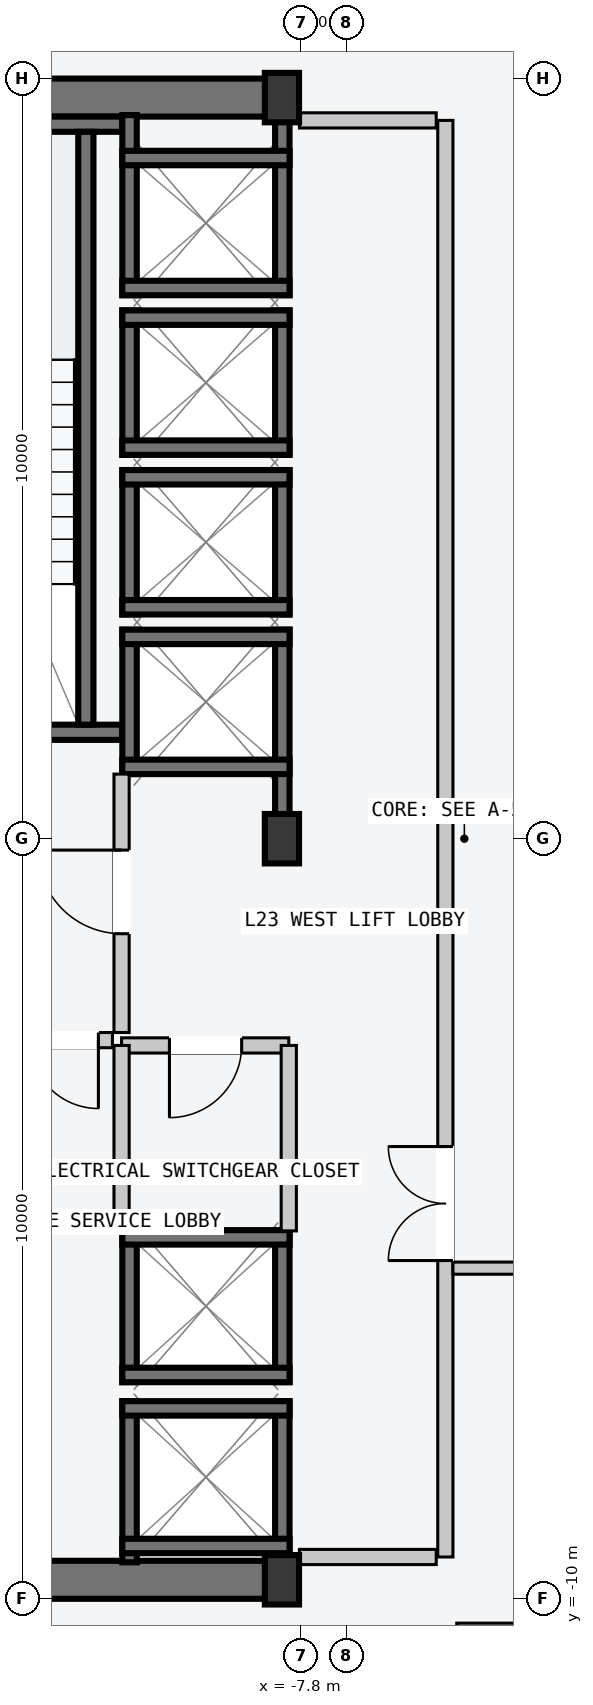
"""IFC4 building model, lengths in metres.
Left out: names, types, materials, properties, quantities, classifications, styles, units other than length and angle.
Written with IfcOpenShell. Run it as: python <this file> out.ifc"""

import sys

from ifc_helpers import new_model, si_unit, direction, frame, frame_2d, origin, origin_2d, place, context, subcontext, project, spatial, rectangle, i_section, extrude, element, fill, save


model = new_model("IFC4")
c1 = context("Model", 3, precision=1e-05, world=origin(), true_north=direction((0.0, 1.0)))
c2 = subcontext(c1, "Body", "Model", "MODEL_VIEW")
j1 = project(units=[si_unit("LENGTHUNIT", "METRE"), si_unit("PLANEANGLEUNIT", "RADIAN")], contexts=[c1])
p1 = place(None, origin())
s1 = spatial("IfcSite", under=j1, at=p1, CompositionType="ELEMENT")
p2 = place(p1, origin())
s2 = spatial("IfcBuilding", under=s1, at=p2, CompositionType="ELEMENT")
p3 = place(p2, frame((0.0, 0.0, 91.8)))
s3 = spatial("IfcBuildingStorey", under=s2, at=p3, CompositionType="ELEMENT", Elevation=91.8)
for number, where, z_axis, x_axis in (
    (1, (-14.53, -9.75, -0.2), (0.0, 0.0, 1.0), (1.0, 0.0, 0.0)),
    (2, (-14.53, 9.75, -0.2), (0.0, 0.0, 1.0), (1.0, 0.0, 0.0)),
):
    element("IfcWall", number, at=place(p3, frame(where, z_axis=z_axis, x_axis=x_axis)), inside=s3, PredefinedType="SHEAR", context=c2, shape_type="SweptSolid", body=[
        extrude(rectangle(XDim=6.46, YDim=0.5, at=frame_2d((3.23, 0.0))), origin(), (0.0, 0.0, 1.0), 3.6),
    ])
p4 = place(p3, frame((-14.25, 1.4, -0.2), z_axis=(0.0, 0.0, 1.0), x_axis=(1.0, 0.0, 0.0)))
e3 = element("IfcWall", 3, at=p4, inside=s3, PredefinedType="SOLIDWALL", context=c2, shape_type="SweptSolid", body=[
    extrude(rectangle(XDim=4.1, YDim=0.2, at=frame_2d((2.05, 0.0))), origin(), (0.0, 0.0, 1.0), 3.6),
])
p5 = place(p4, frame((1.5, 0.0, 0.2)))
e4 = element("IfcOpeningElement", 4, at=p5, cuts=e3, PredefinedType="OPENING", context=c2, shape_type="SweptSolid", body=[
    extrude(rectangle(XDim=1.12, YDim=2.18, at=frame_2d((0.56, 1.09))), frame((0.0, 0.11, 0.0), z_axis=(0.0, -1.0, 0.0), x_axis=(1.0, 0.0, 0.0)), (0.0, 0.0, 1.0), 0.22),
])
p6 = place(p3, frame((-14.25, 9.4, -0.2), z_axis=(0.0, 0.0, 1.0), x_axis=(1.0, 0.0, 0.0)))
e5 = element("IfcWall", 5, at=p6, inside=s3, PredefinedType="SOLIDWALL", context=c2, shape_type="SweptSolid", body=[
    extrude(rectangle(XDim=4.1, YDim=0.2, at=frame_2d((2.05, 0.0))), origin(), (0.0, 0.0, 1.0), 3.6),
])
p7 = place(p3, frame((-10.63, 1.5, -0.2), z_axis=(0.0, 0.0, 1.0), x_axis=(0.0, 1.0, 0.0)))
e6 = element("IfcWall", 6, at=p7, inside=s3, PredefinedType="SOLIDWALL", context=c2, shape_type="SweptSolid", body=[
    extrude(rectangle(XDim=7.8, YDim=0.2, at=frame_2d((3.9, 0.0))), origin(), (0.0, 0.0, 1.0), 3.6),
])
for number, where, z_axis, x_axis in (
    (7, (-8.05, -9.75, 0.0), (0.0, 0.0, 1.0), (1.0, 0.0, 0.0)),
    (8, (-8.05, 0.0, 0.0), (0.0, 0.0, 1.0), (1.0, 0.0, 0.0)),
    (9, (-8.05, 9.75, 0.0), (0.0, 0.0, 1.0), (1.0, 0.0, 0.0)),
):
    element("IfcColumn", number, at=place(p3, frame(where, z_axis=z_axis, x_axis=x_axis)), inside=s3, PredefinedType="COLUMN", context=c2, shape_type="SweptSolid", body=[
        extrude(i_section(OverallWidth=0.45, OverallDepth=0.65, WebThickness=0.025, FlangeThickness=0.04, at=origin_2d()), origin(), (0.0, 0.0, 1.0), 3.6),
    ])
p8 = place(p3, frame((-8.045, 0.21, -0.2), z_axis=(0.0, 0.0, 1.0), x_axis=(0.0, 1.0, 0.0)))
e10 = element("IfcWall", 10, at=p8, inside=s3, PredefinedType="SOLIDWALL", context=c2, shape_type="SweptSolid", body=[
    extrude(rectangle(XDim=2.54, YDim=0.19, at=frame_2d((1.27, 0.0))), origin(), (0.0, 0.0, 1.0), 3.6),
])
p9 = place(p3, frame((-10.055, 0.85, -0.2), z_axis=(0.0, 0.0, 1.0), x_axis=(0.0, 1.0, 0.0)))
e11 = element("IfcWall", 11, at=p9, inside=s3, PredefinedType="SOLIDWALL", context=c2, shape_type="SweptSolid", body=[
    extrude(rectangle(XDim=1.9, YDim=0.19, at=frame_2d((0.95, 0.0))), origin(), (0.0, 0.0, 1.0), 3.6),
])
for number, where, z_axis, x_axis in (
    (12, (-10.15, 2.655, -0.2), (0.0, 0.0, 1.0), (1.0, 0.0, 0.0)),
    (13, (-10.15, 0.945, -0.2), (0.0, 0.0, 1.0), (1.0, 0.0, 0.0)),
):
    element("IfcWall", number, at=place(p3, frame(where, z_axis=z_axis, x_axis=x_axis)), inside=s3, PredefinedType="SOLIDWALL", context=c2, shape_type="SweptSolid", body=[
        extrude(rectangle(XDim=2.2, YDim=0.19, at=frame_2d((1.1, 0.0))), origin(), (0.0, 0.0, 1.0), 3.6),
    ])
for number, where, z_axis, x_axis in (
    (14, (-8.045, 2.95, -0.2), (0.0, 0.0, 1.0), (0.0, 1.0, 0.0)),
    (15, (-10.055, 2.95, -0.2), (0.0, 0.0, 1.0), (0.0, 1.0, 0.0)),
):
    element("IfcWall", number, at=place(p3, frame(where, z_axis=z_axis, x_axis=x_axis)), inside=s3, PredefinedType="SOLIDWALL", context=c2, shape_type="SweptSolid", body=[
        extrude(rectangle(XDim=1.9, YDim=0.19, at=frame_2d((0.95, 0.0))), origin(), (0.0, 0.0, 1.0), 3.6),
    ])
for number, where, z_axis, x_axis in (
    (16, (-10.15, 4.755, -0.2), (0.0, 0.0, 1.0), (1.0, 0.0, 0.0)),
    (17, (-10.15, 3.045, -0.2), (0.0, 0.0, 1.0), (1.0, 0.0, 0.0)),
):
    element("IfcWall", number, at=place(p3, frame(where, z_axis=z_axis, x_axis=x_axis)), inside=s3, PredefinedType="SOLIDWALL", context=c2, shape_type="SweptSolid", body=[
        extrude(rectangle(XDim=2.2, YDim=0.19, at=frame_2d((1.1, 0.0))), origin(), (0.0, 0.0, 1.0), 3.6),
    ])
for number, where, z_axis, x_axis in (
    (18, (-8.045, 5.05, -0.2), (0.0, 0.0, 1.0), (0.0, 1.0, 0.0)),
    (19, (-10.055, 5.05, -0.2), (0.0, 0.0, 1.0), (0.0, 1.0, 0.0)),
):
    element("IfcWall", number, at=place(p3, frame(where, z_axis=z_axis, x_axis=x_axis)), inside=s3, PredefinedType="SOLIDWALL", context=c2, shape_type="SweptSolid", body=[
        extrude(rectangle(XDim=1.9, YDim=0.19, at=frame_2d((0.95, 0.0))), origin(), (0.0, 0.0, 1.0), 3.6),
    ])
for number, where, z_axis, x_axis in (
    (20, (-10.15, 6.855, -0.2), (0.0, 0.0, 1.0), (1.0, 0.0, 0.0)),
    (21, (-10.15, 5.145, -0.2), (0.0, 0.0, 1.0), (1.0, 0.0, 0.0)),
):
    element("IfcWall", number, at=place(p3, frame(where, z_axis=z_axis, x_axis=x_axis)), inside=s3, PredefinedType="SOLIDWALL", context=c2, shape_type="SweptSolid", body=[
        extrude(rectangle(XDim=2.2, YDim=0.19, at=frame_2d((1.1, 0.0))), origin(), (0.0, 0.0, 1.0), 3.6),
    ])
for number, where, z_axis, x_axis in (
    (22, (-8.045, 7.15, -0.2), (0.0, 0.0, 1.0), (0.0, 1.0, 0.0)),
    (23, (-10.055, 7.15, -0.2), (0.0, 0.0, 1.0), (0.0, 1.0, 0.0)),
):
    element("IfcWall", number, at=place(p3, frame(where, z_axis=z_axis, x_axis=x_axis)), inside=s3, PredefinedType="SOLIDWALL", context=c2, shape_type="SweptSolid", body=[
        extrude(rectangle(XDim=2.37, YDim=0.19, at=frame_2d((1.185, 0.0))), origin(), (0.0, 0.0, 1.0), 3.6),
    ])
for number, where, z_axis, x_axis in (
    (24, (-10.15, 8.955, -0.2), (0.0, 0.0, 1.0), (1.0, 0.0, 0.0)),
    (25, (-10.15, 7.245, -0.2), (0.0, 0.0, 1.0), (1.0, 0.0, 0.0)),
):
    element("IfcWall", number, at=place(p3, frame(where, z_axis=z_axis, x_axis=x_axis)), inside=s3, PredefinedType="SOLIDWALL", context=c2, shape_type="SweptSolid", body=[
        extrude(rectangle(XDim=2.2, YDim=0.19, at=frame_2d((1.1, 0.0))), origin(), (0.0, 0.0, 1.0), 3.6),
    ])
for number, where, z_axis, x_axis in (
    (26, (-8.045, -9.52, -0.2), (0.0, 0.0, 1.0), (0.0, 1.0, 0.0)),
    (27, (-10.055, -9.52, -0.2), (0.0, 0.0, 1.0), (0.0, 1.0, 0.0)),
):
    element("IfcWall", number, at=place(p3, frame(where, z_axis=z_axis, x_axis=x_axis)), inside=s3, PredefinedType="SOLIDWALL", context=c2, shape_type="SweptSolid", body=[
        extrude(rectangle(XDim=2.12, YDim=0.19, at=frame_2d((1.06, 0.0))), origin(), (0.0, 0.0, 1.0), 3.6),
    ])
for number, where, z_axis, x_axis in (
    (28, (-10.15, -7.495, -0.2), (0.0, 0.0, 1.0), (1.0, 0.0, 0.0)),
    (29, (-10.15, -9.305, -0.2), (0.0, 0.0, 1.0), (1.0, 0.0, 0.0)),
):
    element("IfcWall", number, at=place(p3, frame(where, z_axis=z_axis, x_axis=x_axis)), inside=s3, PredefinedType="SOLIDWALL", context=c2, shape_type="SweptSolid", body=[
        extrude(rectangle(XDim=2.2, YDim=0.19, at=frame_2d((1.1, 0.0))), origin(), (0.0, 0.0, 1.0), 3.6),
    ])
for number, where, z_axis, x_axis in (
    (30, (-8.045, -7.15, -0.2), (0.0, 0.0, 1.0), (0.0, 1.0, 0.0)),
    (31, (-10.055, -7.15, -0.2), (0.0, 0.0, 1.0), (0.0, 1.0, 0.0)),
):
    element("IfcWall", number, at=place(p3, frame(where, z_axis=z_axis, x_axis=x_axis)), inside=s3, PredefinedType="SOLIDWALL", context=c2, shape_type="SweptSolid", body=[
        extrude(rectangle(XDim=2.0, YDim=0.19, at=frame_2d((1.0, 0.0))), origin(), (0.0, 0.0, 1.0), 3.6),
    ])
for number, where, z_axis, x_axis in (
    (32, (-10.15, -5.245, -0.2), (0.0, 0.0, 1.0), (1.0, 0.0, 0.0)),
    (33, (-10.15, -7.055, -0.2), (0.0, 0.0, 1.0), (1.0, 0.0, 0.0)),
):
    element("IfcWall", number, at=place(p3, frame(where, z_axis=z_axis, x_axis=x_axis)), inside=s3, PredefinedType="SOLIDWALL", context=c2, shape_type="SweptSolid", body=[
        extrude(rectangle(XDim=2.2, YDim=0.19, at=frame_2d((1.1, 0.0))), origin(), (0.0, 0.0, 1.0), 3.6),
    ])
p10 = place(p3, frame((-5.9, -9.45, 0.0), z_axis=(0.0, 0.0, 1.0), x_axis=(0.0, 1.0, 0.0)))
e34 = element("IfcWall", 34, at=p10, inside=s3, PredefinedType="PARTITIONING", context=c2, shape_type="SweptSolid", body=[
    extrude(rectangle(XDim=18.9, YDim=0.2, at=frame_2d((9.45, 0.0))), origin(), (0.0, 0.0, 1.0), 3.4),
])
p11 = place(p10, frame((3.9, 0.0, 0.0)))
e35 = element("IfcOpeningElement", 35, at=p11, cuts=e34, PredefinedType="OPENING", context=c2, shape_type="SweptSolid", body=[
    extrude(rectangle(XDim=1.5, YDim=2.2, at=frame_2d((0.75, 1.1))), frame((0.0, 0.11, 0.0), z_axis=(0.0, -1.0, 0.0), x_axis=(1.0, 0.0, 0.0)), (0.0, 0.0, 1.0), 0.22),
])
for number, where, z_axis, x_axis in (
    (36, (-6.02, -9.45, 0.0), (0.0, 0.0, 1.0), (-1.0, 0.0, 0.0)),
    (37, (-6.02, 9.45, 0.0), (0.0, 0.0, 1.0), (-1.0, 0.0, 0.0)),
):
    element("IfcWall", number, at=place(p3, frame(where, z_axis=z_axis, x_axis=x_axis)), inside=s3, PredefinedType="PARTITIONING", context=c2, shape_type="SweptSolid", body=[
        extrude(rectangle(XDim=1.8, YDim=0.2, at=frame_2d((0.9, 0.0))), origin(), (0.0, 0.0, 1.0), 3.4),
    ])
p12 = place(p3, frame((-10.16, -2.55, 0.0), z_axis=(0.0, 0.0, 1.0), x_axis=(0.0, 1.0, 0.0)))
e38 = element("IfcWall", 38, at=p12, inside=s3, PredefinedType="PARTITIONING", context=c2, shape_type="SweptSolid", body=[
    extrude(rectangle(XDim=3.4, YDim=0.2, at=frame_2d((1.7, 0.0))), origin(), (0.0, 0.0, 1.0), 3.4),
])
p13 = place(p12, frame((1.3, 0.0, 0.0)))
e39 = element("IfcOpeningElement", 39, at=p13, cuts=e38, PredefinedType="OPENING", context=c2, shape_type="SweptSolid", body=[
    extrude(rectangle(XDim=1.1, YDim=2.15, at=frame_2d((0.55, 1.075))), frame((0.0, 0.11, 0.0), z_axis=(0.0, -1.0, 0.0), x_axis=(1.0, 0.0, 0.0)), (0.0, 0.0, 1.0), 0.22),
])
p14 = place(p3, frame((-10.28, -2.65, 0.0), z_axis=(0.0, 0.0, 1.0), x_axis=(-1.0, 0.0, 0.0)))
e40 = element("IfcWall", 40, at=p14, inside=s3, PredefinedType="PARTITIONING", context=c2, shape_type="SweptSolid", body=[
    extrude(rectangle(XDim=1.27, YDim=0.2, at=frame_2d((0.635, 0.0))), origin(), (0.0, 0.0, 1.0), 3.4),
])
p15 = place(p14, frame((0.185, 0.0, 0.0)))
e41 = element("IfcOpeningElement", 41, at=p15, cuts=e40, PredefinedType="OPENING", context=c2, shape_type="SweptSolid", body=[
    extrude(rectangle(XDim=0.9, YDim=2.15, at=frame_2d((0.45, 1.075))), frame((0.0, 0.11, 0.0), z_axis=(0.0, -1.0, 0.0), x_axis=(1.0, 0.0, 0.0)), (0.0, 0.0, 1.0), 0.22),
])
p16 = place(p3, frame((-7.96, -2.72, 0.0), z_axis=(0.0, 0.0, 1.0), x_axis=(-1.0, 0.0, 0.0)))
e42 = element("IfcWall", 42, at=p16, inside=s3, PredefinedType="PARTITIONING", context=c2, shape_type="SweptSolid", body=[
    extrude(rectangle(XDim=2.2, YDim=0.2, at=frame_2d((1.1, 0.0))), origin(), (0.0, 0.0, 1.0), 3.4),
])
p17 = place(p16, frame((0.62, 0.0, 0.0)))
e43 = element("IfcOpeningElement", 43, at=p17, cuts=e42, PredefinedType="OPENING", context=c2, shape_type="SweptSolid", body=[
    extrude(rectangle(XDim=0.95, YDim=2.1, at=frame_2d((0.475, 1.05))), frame((0.0, 0.11, 0.0), z_axis=(0.0, -1.0, 0.0), x_axis=(1.0, 0.0, 0.0)), (0.0, 0.0, 1.0), 0.22),
])
for number, where, z_axis, x_axis in (
    (44, (-7.96, -5.16, 0.0), (0.0, 0.0, 1.0), (0.0, 1.0, 0.0)),
    (45, (-10.16, -5.16, 0.0), (0.0, 0.0, 1.0), (0.0, 1.0, 0.0)),
):
    element("IfcWall", number, at=place(p3, frame(where, z_axis=z_axis, x_axis=x_axis)), inside=s3, PredefinedType="PARTITIONING", context=c2, shape_type="SweptSolid", body=[
        extrude(rectangle(XDim=2.44, YDim=0.2, at=frame_2d((1.22, 0.0))), origin(), (0.0, 0.0, 1.0), 3.4),
    ])
p18 = place(p3, frame((-5.8, -5.65, 0.0), z_axis=(0.0, 0.0, 1.0), x_axis=(1.0, 0.0, 0.0)))
e46 = element("IfcWall", 46, at=p18, inside=s3, PredefinedType="PARTITIONING", context=c2, shape_type="SweptSolid", body=[
    extrude(rectangle(XDim=11.6, YDim=0.16, at=frame_2d((5.8, 0.0))), origin(), (0.0, 0.0, 1.0), 3.4),
])
p19 = place(p18, frame((5.1, 0.0, 0.0)))
e47 = element("IfcOpeningElement", 47, at=p19, cuts=e46, PredefinedType="OPENING", context=c2, shape_type="SweptSolid", body=[
    extrude(rectangle(XDim=1.4, YDim=2.2, at=frame_2d((0.7, 1.1))), frame((0.0, 0.09, 0.0), z_axis=(0.0, -1.0, 0.0), x_axis=(1.0, 0.0, 0.0)), (0.0, 0.0, 1.0), 0.18),
])
p20 = place(p3, frame((-5.75, -10.4, 0.0), z_axis=(0.0, 0.0, 1.0), x_axis=(1.0, 0.0, 0.0)))
e48 = element("IfcWall", 48, at=p20, inside=s3, PredefinedType="PARTITIONING", context=c2, shape_type="SweptSolid", body=[
    extrude(rectangle(XDim=11.5, YDim=0.16, at=frame_2d((5.75, 0.0))), origin(), (0.0, 0.0, 1.0), 3.4),
])
p21 = place(p20, frame((5.05, 0.0, 0.0)))
e49 = element("IfcOpeningElement", 49, at=p21, cuts=e48, PredefinedType="OPENING", context=c2, shape_type="SweptSolid", body=[
    extrude(rectangle(XDim=1.4, YDim=2.2, at=frame_2d((0.7, 1.1))), frame((0.0, 0.09, 0.0), z_axis=(0.0, -1.0, 0.0), x_axis=(1.0, 0.0, 0.0)), (0.0, 0.0, 1.0), 0.18),
])
p22 = place(p11, origin())
e50 = element("IfcDoor", 50, at=p22, inside=s3, OperationType="DOUBLE_DOOR_SINGLE_SWING", PredefinedType="DOOR", context=c2, shape_type="SweptSolid", body=[
    extrude(rectangle(XDim=1.5, YDim=2.2, at=frame_2d((0.75, 1.1))), frame((0.0, 0.025, 0.0), z_axis=(0.0, -1.0, 0.0), x_axis=(1.0, 0.0, 0.0)), (0.0, 0.0, 1.0), 0.05),
])
fill(e35, e50)
p23 = place(p13, origin())
e51 = element("IfcDoor", 51, at=p23, inside=s3, OperationType="SINGLE_SWING_RIGHT", PredefinedType="DOOR", context=c2, shape_type="SweptSolid", body=[
    extrude(rectangle(XDim=1.1, YDim=2.15, at=frame_2d((0.55, 1.075))), frame((0.0, 0.025, 0.0), z_axis=(0.0, -1.0, 0.0), x_axis=(1.0, 0.0, 0.0)), (0.0, 0.0, 1.0), 0.05),
])
fill(e39, e51)
p24 = place(p15, origin())
e52 = element("IfcDoor", 52, at=p24, inside=s3, OperationType="SINGLE_SWING_LEFT", PredefinedType="DOOR", context=c2, shape_type="SweptSolid", body=[
    extrude(rectangle(XDim=0.9, YDim=2.15, at=frame_2d((0.45, 1.075))), frame((0.0, 0.025, 0.0), z_axis=(0.0, -1.0, 0.0), x_axis=(1.0, 0.0, 0.0)), (0.0, 0.0, 1.0), 0.05),
])
fill(e41, e52)
p25 = place(p17, origin())
e53 = element("IfcDoor", 53, at=p25, inside=s3, OperationType="SINGLE_SWING_RIGHT", PredefinedType="DOOR", context=c2, shape_type="SweptSolid", body=[
    extrude(rectangle(XDim=0.95, YDim=2.1, at=frame_2d((0.475, 1.05))), frame((0.0, 0.025, 0.0), z_axis=(0.0, -1.0, 0.0), x_axis=(1.0, 0.0, 0.0)), (0.0, 0.0, 1.0), 0.05),
])
fill(e43, e53)
save(model, sys.argv[1])
